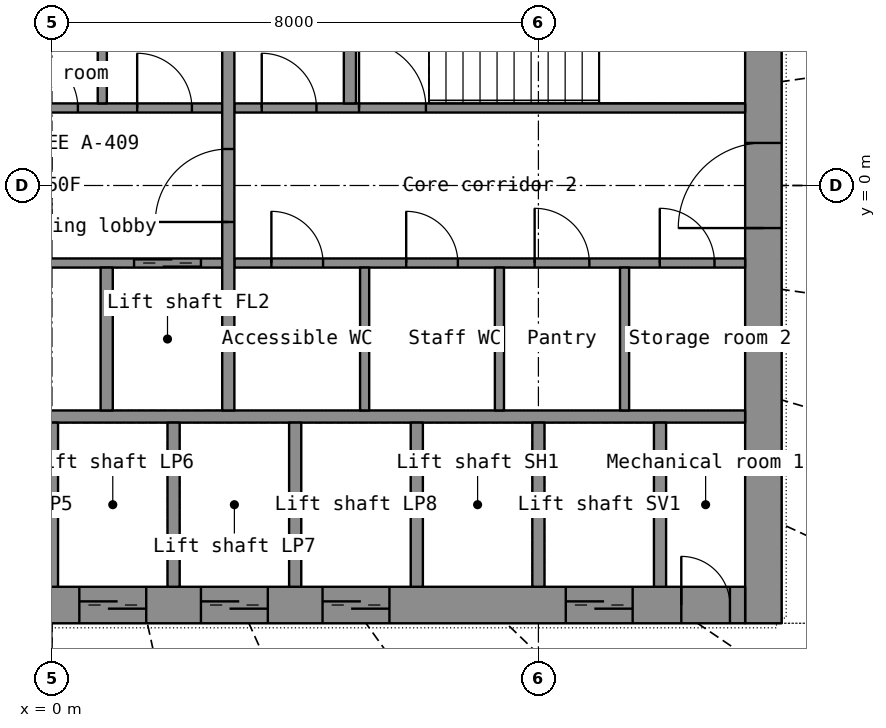
"""IFC4 building model, lengths in metres.
Left out: names, types, materials, properties, quantities, classifications, styles, units other than length and angle.
Written with IfcOpenShell. Run it as: python <this file> out.ifc"""

import sys

from ifc_helpers import new_model, si_unit, direction, frame, frame_2d, origin, place, context, subcontext, project, spatial, rectangle, extrude, element, fill, save


model = new_model("IFC4")
c1 = context("Model", 3, precision=1e-05, world=origin(), true_north=direction((0.0, 1.0)))
c2 = subcontext(c1, "Body", "Model", "MODEL_VIEW")
j1 = project(units=[si_unit("LENGTHUNIT", "METRE"), si_unit("PLANEANGLEUNIT", "RADIAN")], contexts=[c1])
p1 = place(None, origin())
s1 = spatial("IfcSite", under=j1, at=p1, CompositionType="ELEMENT")
p2 = place(p1, origin())
s2 = spatial("IfcBuilding", under=s1, at=p2, CompositionType="ELEMENT")
p3 = place(p2, frame((0.0, 0.0, 55.6)))
s3 = spatial("IfcBuildingStorey", under=s2, at=p3, CompositionType="ELEMENT", Elevation=55.6)
p4 = place(p3, frame((11.7, -7.2, 0.0), z_axis=(0.0, 0.0, 1.0), x_axis=(0.0, 1.0, 0.0)))
e1 = element("IfcWall", 1, at=p4, inside=s3, PredefinedType="SHEAR", context=c2, shape_type="SweptSolid", body=[
    extrude(rectangle(XDim=14.4, YDim=0.6, at=frame_2d((7.2, 0.0))), origin(), (0.0, 0.0, 1.0), 3.3),
])
p5 = place(p4, frame((6.5, 0.0, 0.0)))
e2 = element("IfcOpeningElement", 2, at=p5, cuts=e1, PredefinedType="OPENING", context=c2, shape_type="SweptSolid", body=[
    extrude(rectangle(XDim=1.4, YDim=2.2, at=frame_2d((0.7, 1.1))), frame((0.0, 0.31, 0.0), z_axis=(0.0, -1.0, 0.0), x_axis=(1.0, 0.0, 0.0)), (0.0, 0.0, 1.0), 0.62),
])
p6 = place(p3, frame((-11.4, -6.9, 0.0), z_axis=(0.0, 0.0, 1.0), x_axis=(1.0, 0.0, 0.0)))
e3 = element("IfcWall", 3, at=p6, inside=s3, PredefinedType="SHEAR", context=c2, shape_type="SweptSolid", body=[
    extrude(rectangle(XDim=22.8, YDim=0.6, at=frame_2d((11.4, 0.0))), origin(), (0.0, 0.0, 1.0), 3.3),
])
p7 = place(p6, frame((1.85, 0.0, 0.0)))
e4 = element("IfcOpeningElement", 4, at=p7, cuts=e3, PredefinedType="OPENING", context=c2, shape_type="SweptSolid", body=[
    extrude(rectangle(XDim=1.1, YDim=2.2, at=frame_2d((0.55, 1.1))), frame((0.0, 0.31, 0.0), z_axis=(0.0, -1.0, 0.0), x_axis=(1.0, 0.0, 0.0)), (0.0, 0.0, 1.0), 0.62),
])
p8 = place(p6, frame((3.85, 0.0, 0.0)))
e5 = element("IfcOpeningElement", 5, at=p8, cuts=e3, PredefinedType="OPENING", context=c2, shape_type="SweptSolid", body=[
    extrude(rectangle(XDim=1.1, YDim=2.2, at=frame_2d((0.55, 1.1))), frame((0.0, 0.31, 0.0), z_axis=(0.0, -1.0, 0.0), x_axis=(1.0, 0.0, 0.0)), (0.0, 0.0, 1.0), 0.62),
])
p9 = place(p6, frame((5.85, 0.0, 0.0)))
e6 = element("IfcOpeningElement", 6, at=p9, cuts=e3, PredefinedType="OPENING", context=c2, shape_type="SweptSolid", body=[
    extrude(rectangle(XDim=1.1, YDim=2.2, at=frame_2d((0.55, 1.1))), frame((0.0, 0.31, 0.0), z_axis=(0.0, -1.0, 0.0), x_axis=(1.0, 0.0, 0.0)), (0.0, 0.0, 1.0), 0.62),
])
p10 = place(p6, frame((7.85, 0.0, 0.0)))
e7 = element("IfcOpeningElement", 7, at=p10, cuts=e3, PredefinedType="OPENING", context=c2, shape_type="SweptSolid", body=[
    extrude(rectangle(XDim=1.1, YDim=2.2, at=frame_2d((0.55, 1.1))), frame((0.0, 0.31, 0.0), z_axis=(0.0, -1.0, 0.0), x_axis=(1.0, 0.0, 0.0)), (0.0, 0.0, 1.0), 0.62),
])
p11 = place(p6, frame((9.85, 0.0, 0.0)))
e8 = element("IfcOpeningElement", 8, at=p11, cuts=e3, PredefinedType="OPENING", context=c2, shape_type="SweptSolid", body=[
    extrude(rectangle(XDim=1.1, YDim=2.2, at=frame_2d((0.55, 1.1))), frame((0.0, 0.31, 0.0), z_axis=(0.0, -1.0, 0.0), x_axis=(1.0, 0.0, 0.0)), (0.0, 0.0, 1.0), 0.62),
])
p12 = place(p6, frame((11.85, 0.0, 0.0)))
e9 = element("IfcOpeningElement", 9, at=p12, cuts=e3, PredefinedType="OPENING", context=c2, shape_type="SweptSolid", body=[
    extrude(rectangle(XDim=1.1, YDim=2.2, at=frame_2d((0.55, 1.1))), frame((0.0, 0.31, 0.0), z_axis=(0.0, -1.0, 0.0), x_axis=(1.0, 0.0, 0.0)), (0.0, 0.0, 1.0), 0.62),
])
p13 = place(p6, frame((13.85, 0.0, 0.0)))
e10 = element("IfcOpeningElement", 10, at=p13, cuts=e3, PredefinedType="OPENING", context=c2, shape_type="SweptSolid", body=[
    extrude(rectangle(XDim=1.1, YDim=2.2, at=frame_2d((0.55, 1.1))), frame((0.0, 0.31, 0.0), z_axis=(0.0, -1.0, 0.0), x_axis=(1.0, 0.0, 0.0)), (0.0, 0.0, 1.0), 0.62),
])
p14 = place(p6, frame((15.85, 0.0, 0.0)))
e11 = element("IfcOpeningElement", 11, at=p14, cuts=e3, PredefinedType="OPENING", context=c2, shape_type="SweptSolid", body=[
    extrude(rectangle(XDim=1.1, YDim=2.2, at=frame_2d((0.55, 1.1))), frame((0.0, 0.31, 0.0), z_axis=(0.0, -1.0, 0.0), x_axis=(1.0, 0.0, 0.0)), (0.0, 0.0, 1.0), 0.62),
])
p15 = place(p6, frame((19.85, 0.0, 0.0)))
e12 = element("IfcOpeningElement", 12, at=p15, cuts=e3, PredefinedType="OPENING", context=c2, shape_type="SweptSolid", body=[
    extrude(rectangle(XDim=1.1, YDim=2.2, at=frame_2d((0.55, 1.1))), frame((0.0, 0.31, 0.0), z_axis=(0.0, -1.0, 0.0), x_axis=(1.0, 0.0, 0.0)), (0.0, 0.0, 1.0), 0.62),
])
p16 = place(p6, frame((0.25, 0.0, 0.0)))
e13 = element("IfcOpeningElement", 13, at=p16, cuts=e3, PredefinedType="OPENING", context=c2, shape_type="SweptSolid", body=[
    extrude(rectangle(XDim=0.8, YDim=2.05, at=frame_2d((0.4, 1.025))), frame((0.0, 0.31, 0.0), z_axis=(0.0, -1.0, 0.0), x_axis=(1.0, 0.0, 0.0)), (0.0, 0.0, 1.0), 0.62),
])
p17 = place(p6, frame((21.75, 0.0, 0.0)))
e14 = element("IfcOpeningElement", 14, at=p17, cuts=e3, PredefinedType="OPENING", context=c2, shape_type="SweptSolid", body=[
    extrude(rectangle(XDim=0.8, YDim=2.05, at=frame_2d((0.4, 1.025))), frame((0.0, 0.31, 0.0), z_axis=(0.0, -1.0, 0.0), x_axis=(1.0, 0.0, 0.0)), (0.0, 0.0, 1.0), 0.62),
])
p18 = place(p3, frame((-11.4, -3.8, 0.0), z_axis=(0.0, 0.0, 1.0), x_axis=(1.0, 0.0, 0.0)))
e15 = element("IfcWall", 15, at=p18, inside=s3, PredefinedType="SHEAR", context=c2, shape_type="SweptSolid", body=[
    extrude(rectangle(XDim=22.8, YDim=0.2, at=frame_2d((11.4, 0.0))), origin(), (0.0, 0.0, 1.0), 3.3),
])
for number, where, z_axis, x_axis in (
    (16, (0.0, -6.6, 0.0), (0.0, 0.0, 1.0), (0.0, 1.0, 0.0)),
    (17, (2.0, -6.6, 0.0), (0.0, 0.0, 1.0), (0.0, 1.0, 0.0)),
    (18, (4.0, -6.6, 0.0), (0.0, 0.0, 1.0), (0.0, 1.0, 0.0)),
    (19, (6.0, -6.6, 0.0), (0.0, 0.0, 1.0), (0.0, 1.0, 0.0)),
    (20, (8.0, -6.6, 0.0), (0.0, 0.0, 1.0), (0.0, 1.0, 0.0)),
    (21, (10.0, -6.6, 0.0), (0.0, 0.0, 1.0), (0.0, 1.0, 0.0)),
):
    element("IfcWall", number, at=place(p3, frame(where, z_axis=z_axis, x_axis=x_axis)), inside=s3, PredefinedType="SHEAR", context=c2, shape_type="SweptSolid", body=[
        extrude(rectangle(XDim=2.7, YDim=0.2, at=frame_2d((1.35, 0.0))), origin(), (0.0, 0.0, 1.0), 3.3),
    ])
p19 = place(p3, frame((-2.8, -1.275, 0.0), z_axis=(0.0, 0.0, 1.0), x_axis=(1.0, 0.0, 0.0)))
e22 = element("IfcWall", 22, at=p19, inside=s3, PredefinedType="SHEAR", context=c2, shape_type="SweptSolid", body=[
    extrude(rectangle(XDim=5.6, YDim=0.15, at=frame_2d((2.8, 0.0))), origin(), (0.0, 0.0, 1.0), 3.3),
])
p20 = place(p19, frame((4.15, 0.0, 0.0)))
e23 = element("IfcOpeningElement", 23, at=p20, cuts=e22, PredefinedType="OPENING", context=c2, shape_type="SweptSolid", body=[
    extrude(rectangle(XDim=1.1, YDim=2.2, at=frame_2d((0.55, 1.1))), frame((0.0, 0.085, 0.0), z_axis=(0.0, -1.0, 0.0), x_axis=(1.0, 0.0, 0.0)), (0.0, 0.0, 1.0), 0.17),
])
p21 = place(p19, frame((1.35, 0.0, 0.0)))
e24 = element("IfcOpeningElement", 24, at=p21, cuts=e22, PredefinedType="OPENING", context=c2, shape_type="SweptSolid", body=[
    extrude(rectangle(XDim=0.9, YDim=2.1, at=frame_2d((0.45, 1.05))), frame((0.0, 0.085, 0.0), z_axis=(0.0, -1.0, 0.0), x_axis=(1.0, 0.0, 0.0)), (0.0, 0.0, 1.0), 0.17),
])
p22 = place(p3, frame((3.0, -1.275, 0.0), z_axis=(0.0, 0.0, 1.0), x_axis=(1.0, 0.0, 0.0)))
e25 = element("IfcWall", 25, at=p22, inside=s3, PredefinedType="PARTITIONING", context=c2, shape_type="SweptSolid", body=[
    extrude(rectangle(XDim=8.4, YDim=0.15, at=frame_2d((4.2, 0.0))), origin(), (0.0, 0.0, 1.0), 3.3),
])
p23 = place(p22, frame((0.608, 0.0, 0.0)))
e26 = element("IfcOpeningElement", 26, at=p23, cuts=e25, PredefinedType="OPENING", context=c2, shape_type="SweptSolid", body=[
    extrude(rectangle(XDim=0.85, YDim=2.1, at=frame_2d((0.425, 1.05))), frame((0.0, 0.085, 0.0), z_axis=(0.0, -1.0, 0.0), x_axis=(1.0, 0.0, 0.0)), (0.0, 0.0, 1.0), 0.17),
])
p24 = place(p22, frame((2.825, 0.0, 0.0)))
e27 = element("IfcOpeningElement", 27, at=p24, cuts=e25, PredefinedType="OPENING", context=c2, shape_type="SweptSolid", body=[
    extrude(rectangle(XDim=0.85, YDim=2.1, at=frame_2d((0.425, 1.05))), frame((0.0, 0.085, 0.0), z_axis=(0.0, -1.0, 0.0), x_axis=(1.0, 0.0, 0.0)), (0.0, 0.0, 1.0), 0.17),
])
p25 = place(p22, frame((4.938, 0.0, 0.0)))
e28 = element("IfcOpeningElement", 28, at=p25, cuts=e25, PredefinedType="OPENING", context=c2, shape_type="SweptSolid", body=[
    extrude(rectangle(XDim=0.9, YDim=2.1, at=frame_2d((0.45, 1.05))), frame((0.0, 0.085, 0.0), z_axis=(0.0, -1.0, 0.0), x_axis=(1.0, 0.0, 0.0)), (0.0, 0.0, 1.0), 0.17),
])
p26 = place(p22, frame((6.996, 0.0, 0.0)))
e29 = element("IfcOpeningElement", 29, at=p26, cuts=e25, PredefinedType="OPENING", context=c2, shape_type="SweptSolid", body=[
    extrude(rectangle(XDim=0.9, YDim=2.1, at=frame_2d((0.45, 1.05))), frame((0.0, 0.085, 0.0), z_axis=(0.0, -1.0, 0.0), x_axis=(1.0, 0.0, 0.0)), (0.0, 0.0, 1.0), 0.17),
])
p27 = place(p3, frame((-2.8, 1.275, 0.0), z_axis=(0.0, 0.0, 1.0), x_axis=(1.0, 0.0, 0.0)))
e30 = element("IfcWall", 30, at=p27, inside=s3, PredefinedType="SHEAR", context=c2, shape_type="SweptSolid", body=[
    extrude(rectangle(XDim=5.6, YDim=0.15, at=frame_2d((2.8, 0.0))), origin(), (0.0, 0.0, 1.0), 3.3),
])
p28 = place(p27, frame((0.35, 0.0, 0.0)))
e31 = element("IfcOpeningElement", 31, at=p28, cuts=e30, PredefinedType="OPENING", context=c2, shape_type="SweptSolid", body=[
    extrude(rectangle(XDim=1.1, YDim=2.2, at=frame_2d((0.55, 1.1))), frame((0.0, 0.085, 0.0), z_axis=(0.0, -1.0, 0.0), x_axis=(1.0, 0.0, 0.0)), (0.0, 0.0, 1.0), 0.17),
])
p29 = place(p27, frame((2.326, 0.0, 0.0)))
e32 = element("IfcOpeningElement", 32, at=p29, cuts=e30, PredefinedType="OPENING", context=c2, shape_type="SweptSolid", body=[
    extrude(rectangle(XDim=0.9, YDim=2.1, at=frame_2d((0.45, 1.05))), frame((0.0, 0.085, 0.0), z_axis=(0.0, -1.0, 0.0), x_axis=(1.0, 0.0, 0.0)), (0.0, 0.0, 1.0), 0.17),
])
p30 = place(p27, frame((4.201, 0.0, 0.0)))
e33 = element("IfcOpeningElement", 33, at=p30, cuts=e30, PredefinedType="OPENING", context=c2, shape_type="SweptSolid", body=[
    extrude(rectangle(XDim=0.9, YDim=2.1, at=frame_2d((0.45, 1.05))), frame((0.0, 0.085, 0.0), z_axis=(0.0, -1.0, 0.0), x_axis=(1.0, 0.0, 0.0)), (0.0, 0.0, 1.0), 0.17),
])
p31 = place(p3, frame((3.0, 1.275, 0.0), z_axis=(0.0, 0.0, 1.0), x_axis=(1.0, 0.0, 0.0)))
e34 = element("IfcWall", 34, at=p31, inside=s3, PredefinedType="SHEAR", context=c2, shape_type="SweptSolid", body=[
    extrude(rectangle(XDim=8.4, YDim=0.15, at=frame_2d((4.2, 0.0))), origin(), (0.0, 0.0, 1.0), 3.3),
])
p32 = place(p31, frame((2.05, 0.0, 0.0)))
e35 = element("IfcOpeningElement", 35, at=p32, cuts=e34, PredefinedType="OPENING", context=c2, shape_type="SweptSolid", body=[
    extrude(rectangle(XDim=1.1, YDim=2.15, at=frame_2d((0.55, 1.075))), frame((0.0, 0.085, 0.0), z_axis=(0.0, -1.0, 0.0), x_axis=(1.0, 0.0, 0.0)), (0.0, 0.0, 1.0), 0.17),
])
p33 = place(p31, frame((0.45, 0.0, 0.0)))
e36 = element("IfcOpeningElement", 36, at=p33, cuts=e34, PredefinedType="OPENING", context=c2, shape_type="SweptSolid", body=[
    extrude(rectangle(XDim=0.9, YDim=2.1, at=frame_2d((0.45, 1.05))), frame((0.0, 0.085, 0.0), z_axis=(0.0, -1.0, 0.0), x_axis=(1.0, 0.0, 0.0)), (0.0, 0.0, 1.0), 0.17),
])
p34 = place(p3, frame((2.9, -3.7, 0.0), z_axis=(0.0, 0.0, 1.0), x_axis=(0.0, 1.0, 0.0)))
e37 = element("IfcWall", 37, at=p34, inside=s3, PredefinedType="SHEAR", context=c2, shape_type="SweptSolid", body=[
    extrude(rectangle(XDim=7.4, YDim=0.2, at=frame_2d((3.7, 0.0))), origin(), (0.0, 0.0, 1.0), 3.3),
])
p35 = place(p34, frame((3.1, 0.0, 0.0)))
e38 = element("IfcOpeningElement", 38, at=p35, cuts=e37, PredefinedType="OPENING", context=c2, shape_type="SweptSolid", body=[
    extrude(rectangle(XDim=1.2, YDim=2.2, at=frame_2d((0.6, 1.1))), frame((0.0, 0.11, 0.0), z_axis=(0.0, -1.0, 0.0), x_axis=(1.0, 0.0, 0.0)), (0.0, 0.0, 1.0), 0.22),
])
for number, where, z_axis, x_axis in (
    (39, (0.9, -3.7, 0.0), (0.0, 0.0, 1.0), (0.0, 1.0, 0.0)),
    (40, (4.9, 1.35, 0.0), (0.0, 0.0, 1.0), (0.0, 1.0, 0.0)),
):
    element("IfcWall", number, at=place(p3, frame(where, z_axis=z_axis, x_axis=x_axis)), inside=s3, PredefinedType="SHEAR", context=c2, shape_type="SweptSolid", body=[
        extrude(rectangle(XDim=2.35, YDim=0.2, at=frame_2d((1.175, 0.0))), origin(), (0.0, 0.0, 1.0), 3.3),
    ])
for number, where, z_axis, x_axis in (
    (41, (5.142, -3.7, 0.0), (0.0, 0.0, 1.0), (0.0, 1.0, 0.0)),
    (42, (7.359, -3.7, 0.0), (0.0, 0.0, 1.0), (0.0, 1.0, 0.0)),
    (43, (9.417, -3.7, 0.0), (0.0, 0.0, 1.0), (0.0, 1.0, 0.0)),
    (44, (0.827, 1.35, 0.0), (0.0, 0.0, 1.0), (0.0, 1.0, 0.0)),
):
    element("IfcWall", number, at=place(p3, frame(where, z_axis=z_axis, x_axis=x_axis)), inside=s3, PredefinedType="PARTITIONING", context=c2, shape_type="SweptSolid", body=[
        extrude(rectangle(XDim=2.35, YDim=0.15, at=frame_2d((1.175, 0.0))), origin(), (0.0, 0.0, 1.0), 3.3),
    ])
p36 = place(p12, origin())
e45 = element("IfcDoor", 45, at=p36, inside=s3, OperationType="DOUBLE_DOOR_SLIDING", PredefinedType="DOOR", context=c2, shape_type="SweptSolid", body=[
    extrude(rectangle(XDim=1.1, YDim=2.2, at=frame_2d((0.55, 1.1))), frame((0.0, 0.025, 0.0), z_axis=(0.0, -1.0, 0.0), x_axis=(1.0, 0.0, 0.0)), (0.0, 0.0, 1.0), 0.05),
])
fill(e9, e45)
p37 = place(p13, origin())
e46 = element("IfcDoor", 46, at=p37, inside=s3, OperationType="DOUBLE_DOOR_SLIDING", PredefinedType="DOOR", context=c2, shape_type="SweptSolid", body=[
    extrude(rectangle(XDim=1.1, YDim=2.2, at=frame_2d((0.55, 1.1))), frame((0.0, 0.025, 0.0), z_axis=(0.0, -1.0, 0.0), x_axis=(1.0, 0.0, 0.0)), (0.0, 0.0, 1.0), 0.05),
])
fill(e10, e46)
p38 = place(p14, origin())
e47 = element("IfcDoor", 47, at=p38, inside=s3, OperationType="DOUBLE_DOOR_SLIDING", PredefinedType="DOOR", context=c2, shape_type="SweptSolid", body=[
    extrude(rectangle(XDim=1.1, YDim=2.2, at=frame_2d((0.55, 1.1))), frame((0.0, 0.025, 0.0), z_axis=(0.0, -1.0, 0.0), x_axis=(1.0, 0.0, 0.0)), (0.0, 0.0, 1.0), 0.05),
])
fill(e11, e47)
p39 = place(p15, origin())
e48 = element("IfcDoor", 48, at=p39, inside=s3, OperationType="DOUBLE_DOOR_SLIDING", PredefinedType="DOOR", context=c2, shape_type="SweptSolid", body=[
    extrude(rectangle(XDim=1.1, YDim=2.2, at=frame_2d((0.55, 1.1))), frame((0.0, 0.025, 0.0), z_axis=(0.0, -1.0, 0.0), x_axis=(1.0, 0.0, 0.0)), (0.0, 0.0, 1.0), 0.05),
])
fill(e12, e48)
p40 = place(p17, origin())
e49 = element("IfcDoor", 49, at=p40, inside=s3, OperationType="SINGLE_SWING_LEFT", PredefinedType="DOOR", context=c2, shape_type="SweptSolid", body=[
    extrude(rectangle(XDim=0.8, YDim=2.05, at=frame_2d((0.4, 1.025))), frame((0.0, 0.025, 0.0), z_axis=(0.0, -1.0, 0.0), x_axis=(1.0, 0.0, 0.0)), (0.0, 0.0, 1.0), 0.05),
])
fill(e14, e49)
p41 = place(p5, origin())
e50 = element("IfcDoor", 50, at=p41, inside=s3, OperationType="DOUBLE_DOOR_SINGLE_SWING", PredefinedType="DOOR", context=c2, shape_type="SweptSolid", body=[
    extrude(rectangle(XDim=1.4, YDim=2.2, at=frame_2d((0.7, 1.1))), frame((0.0, 0.025, 0.0), z_axis=(0.0, -1.0, 0.0), x_axis=(1.0, 0.0, 0.0)), (0.0, 0.0, 1.0), 0.05),
])
fill(e2, e50)
p42 = place(p35, origin())
e51 = element("IfcDoor", 51, at=p42, inside=s3, OperationType="SINGLE_SWING_LEFT", PredefinedType="DOOR", context=c2, shape_type="SweptSolid", body=[
    extrude(rectangle(XDim=1.2, YDim=2.2, at=frame_2d((0.6, 1.1))), frame((0.0, 0.025, 0.0), z_axis=(0.0, -1.0, 0.0), x_axis=(1.0, 0.0, 0.0)), (0.0, 0.0, 1.0), 0.05),
])
fill(e38, e51)
p43 = place(p20, origin())
e52 = element("IfcDoor", 52, at=p43, inside=s3, OperationType="DOUBLE_DOOR_SLIDING", PredefinedType="DOOR", context=c2, shape_type="SweptSolid", body=[
    extrude(rectangle(XDim=1.1, YDim=2.2, at=frame_2d((0.55, 1.1))), frame((0.0, 0.025, 0.0), z_axis=(0.0, -1.0, 0.0), x_axis=(1.0, 0.0, 0.0)), (0.0, 0.0, 1.0), 0.05),
])
fill(e23, e52)
p44 = place(p32, origin())
e53 = element("IfcDoor", 53, at=p44, inside=s3, OperationType="SINGLE_SWING_LEFT", PredefinedType="DOOR", context=c2, shape_type="SweptSolid", body=[
    extrude(rectangle(XDim=1.1, YDim=2.15, at=frame_2d((0.55, 1.075))), frame((0.0, 0.025, 0.0), z_axis=(0.0, -1.0, 0.0), x_axis=(1.0, 0.0, 0.0)), (0.0, 0.0, 1.0), 0.05),
])
fill(e35, e53)
p45 = place(p23, origin())
e54 = element("IfcDoor", 54, at=p45, inside=s3, OperationType="SINGLE_SWING_LEFT", PredefinedType="DOOR", context=c2, shape_type="SweptSolid", body=[
    extrude(rectangle(XDim=0.85, YDim=2.1, at=frame_2d((0.425, 1.05))), frame((0.0, 0.025, 0.0), z_axis=(0.0, -1.0, 0.0), x_axis=(1.0, 0.0, 0.0)), (0.0, 0.0, 1.0), 0.05),
])
fill(e26, e54)
p46 = place(p24, origin())
e55 = element("IfcDoor", 55, at=p46, inside=s3, OperationType="SINGLE_SWING_LEFT", PredefinedType="DOOR", context=c2, shape_type="SweptSolid", body=[
    extrude(rectangle(XDim=0.85, YDim=2.1, at=frame_2d((0.425, 1.05))), frame((0.0, 0.025, 0.0), z_axis=(0.0, -1.0, 0.0), x_axis=(1.0, 0.0, 0.0)), (0.0, 0.0, 1.0), 0.05),
])
fill(e27, e55)
p47 = place(p25, origin())
e56 = element("IfcDoor", 56, at=p47, inside=s3, OperationType="SINGLE_SWING_LEFT", PredefinedType="DOOR", context=c2, shape_type="SweptSolid", body=[
    extrude(rectangle(XDim=0.9, YDim=2.1, at=frame_2d((0.45, 1.05))), frame((0.0, 0.025, 0.0), z_axis=(0.0, -1.0, 0.0), x_axis=(1.0, 0.0, 0.0)), (0.0, 0.0, 1.0), 0.05),
])
fill(e28, e56)
p48 = place(p26, origin())
e57 = element("IfcDoor", 57, at=p48, inside=s3, OperationType="SINGLE_SWING_LEFT", PredefinedType="DOOR", context=c2, shape_type="SweptSolid", body=[
    extrude(rectangle(XDim=0.9, YDim=2.1, at=frame_2d((0.45, 1.05))), frame((0.0, 0.025, 0.0), z_axis=(0.0, -1.0, 0.0), x_axis=(1.0, 0.0, 0.0)), (0.0, 0.0, 1.0), 0.05),
])
fill(e29, e57)
p49 = place(p29, origin())
e58 = element("IfcDoor", 58, at=p49, inside=s3, OperationType="SINGLE_SWING_LEFT", PredefinedType="DOOR", context=c2, shape_type="SweptSolid", body=[
    extrude(rectangle(XDim=0.9, YDim=2.1, at=frame_2d((0.45, 1.05))), frame((0.0, 0.025, 0.0), z_axis=(0.0, -1.0, 0.0), x_axis=(1.0, 0.0, 0.0)), (0.0, 0.0, 1.0), 0.05),
])
fill(e32, e58)
p50 = place(p30, origin())
e59 = element("IfcDoor", 59, at=p50, inside=s3, OperationType="SINGLE_SWING_LEFT", PredefinedType="DOOR", context=c2, shape_type="SweptSolid", body=[
    extrude(rectangle(XDim=0.9, YDim=2.1, at=frame_2d((0.45, 1.05))), frame((0.0, 0.025, 0.0), z_axis=(0.0, -1.0, 0.0), x_axis=(1.0, 0.0, 0.0)), (0.0, 0.0, 1.0), 0.05),
])
fill(e33, e59)
p51 = place(p33, origin())
e60 = element("IfcDoor", 60, at=p51, inside=s3, OperationType="SINGLE_SWING_LEFT", PredefinedType="DOOR", context=c2, shape_type="SweptSolid", body=[
    extrude(rectangle(XDim=0.9, YDim=2.1, at=frame_2d((0.45, 1.05))), frame((0.0, 0.025, 0.0), z_axis=(0.0, -1.0, 0.0), x_axis=(1.0, 0.0, 0.0)), (0.0, 0.0, 1.0), 0.05),
])
fill(e36, e60)
save(model, sys.argv[1])
